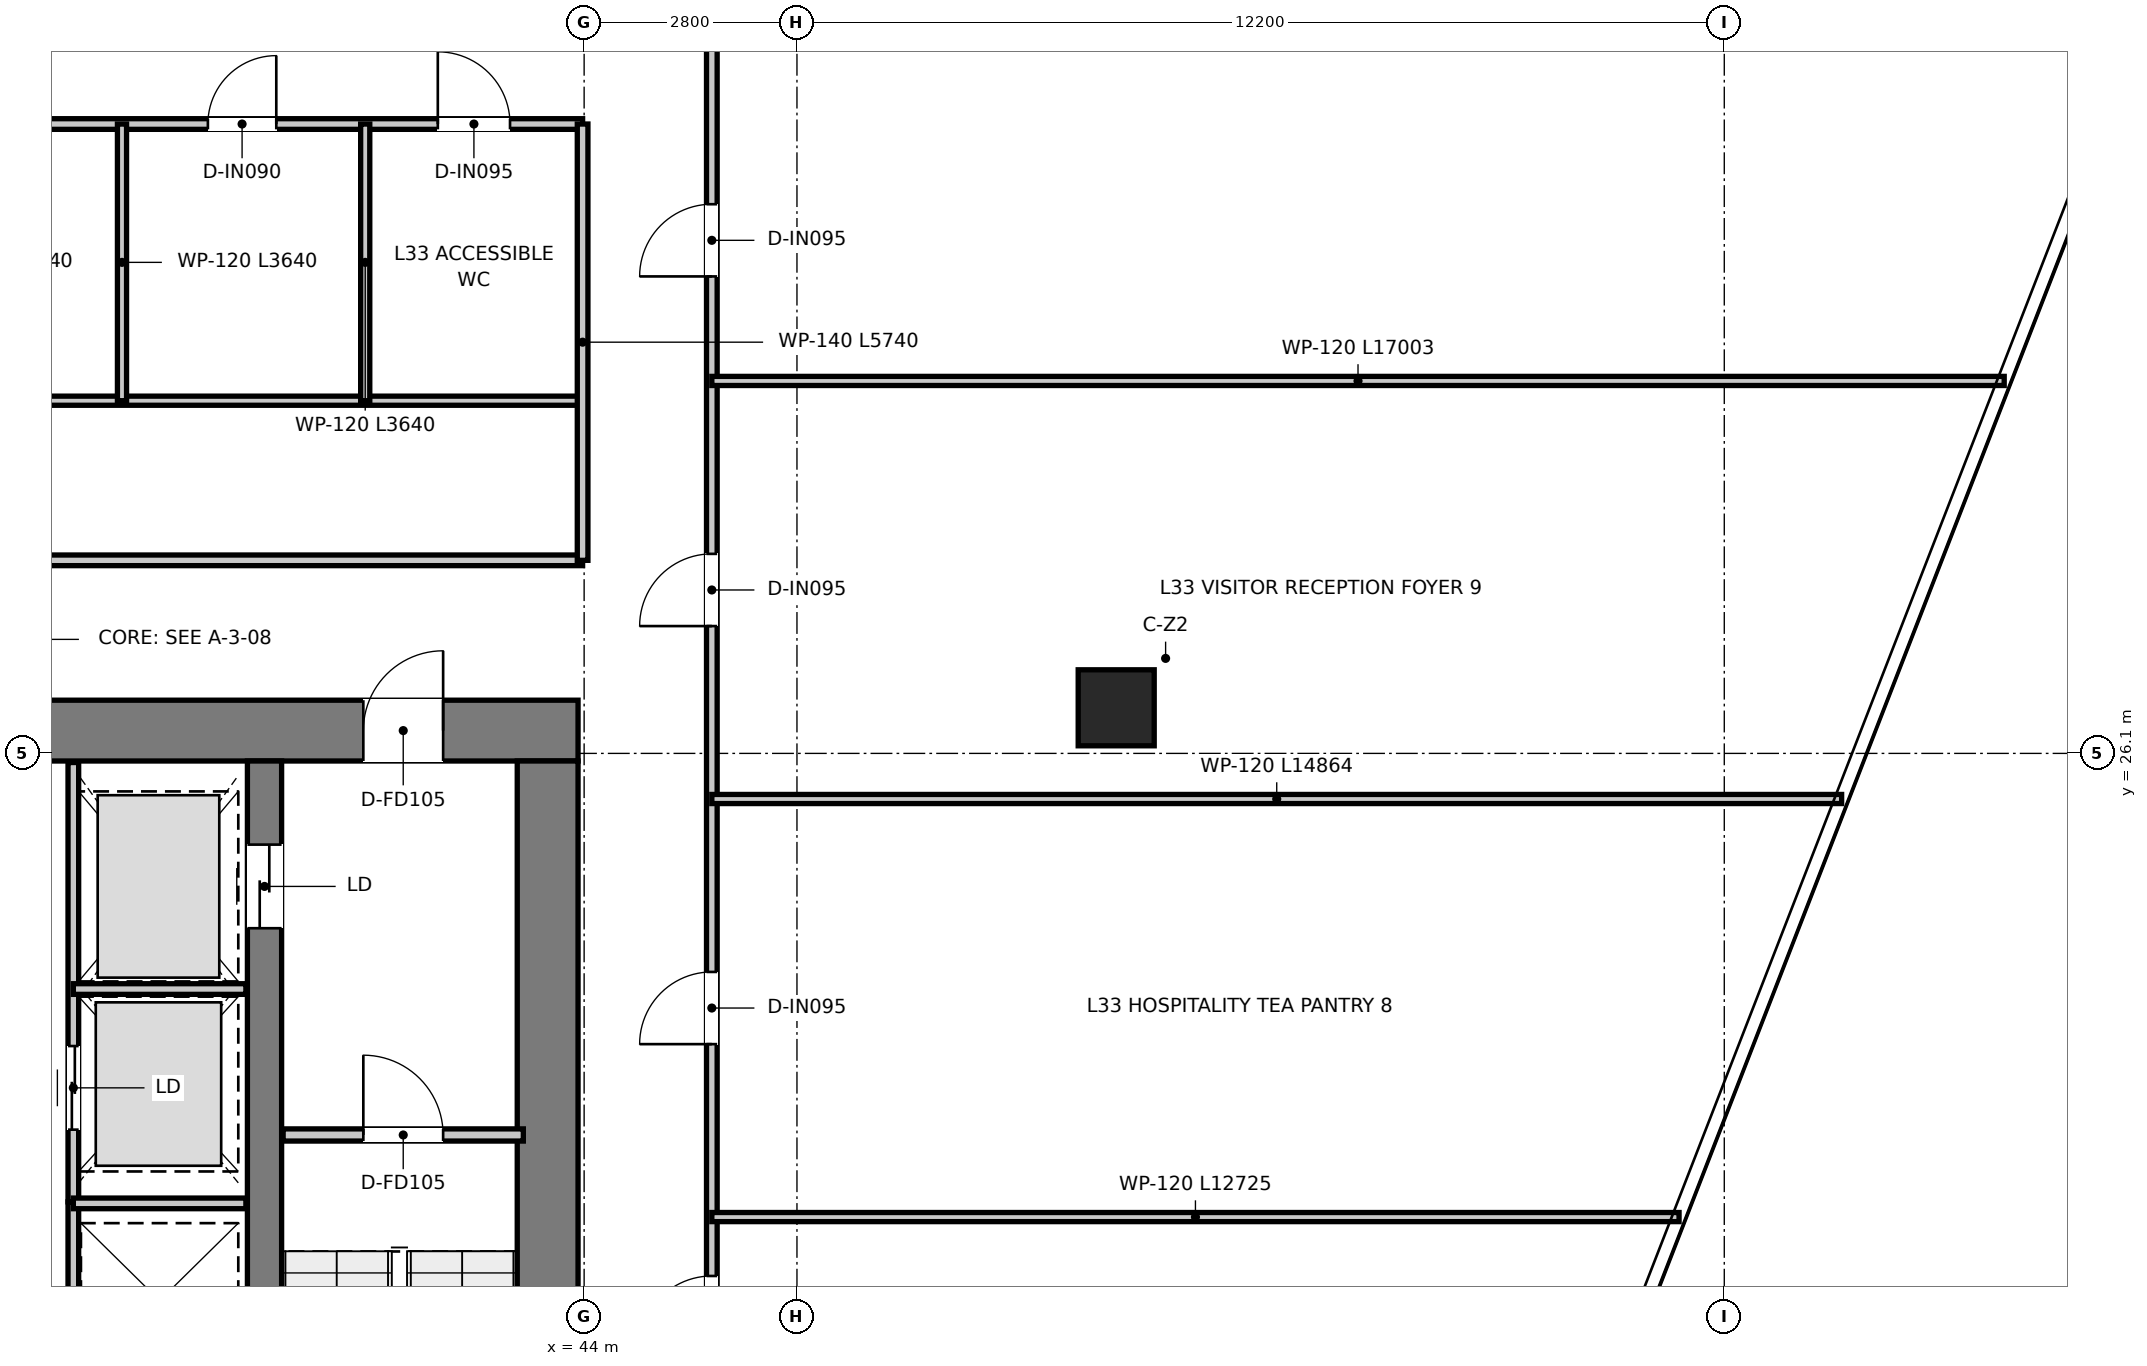
"""IFC4 building model, lengths in metres.
Left out: names, types, materials, properties, quantities, classifications, styles, units other than length and angle.
Written with IfcOpenShell. Run it as: python <this file> out.ifc"""

import sys

from ifc_helpers import new_model, si_unit, direction, frame, frame_2d, origin, origin_2d, place, context, subcontext, project, spatial, rectangle, extrude, source, transform, mapped, element, fill, save


model = new_model("IFC4")
c1 = context("Model", 3, precision=1e-05, world=origin(), true_north=direction((0.0, 1.0)))
c2 = subcontext(c1, "Body", "Model", "MODEL_VIEW")
j1 = project(units=[si_unit("LENGTHUNIT", "METRE"), si_unit("PLANEANGLEUNIT", "RADIAN")], contexts=[c1])
p1 = place(None, origin())
s1 = spatial("IfcSite", under=j1, at=p1, CompositionType="ELEMENT")
p2 = place(p1, origin())
s2 = spatial("IfcBuilding", under=s1, at=p2, CompositionType="ELEMENT")
p3 = place(p2, frame((0.0, 0.0, 137.45)))
s3 = spatial("IfcBuildingStorey", under=s2, at=p3, CompositionType="ELEMENT", Elevation=137.45)
p4 = place(p3, frame((28.08, 26.4, 0.0), z_axis=(0.0, 0.0, 1.0), x_axis=(1.0, 0.0, 0.0)))
e1 = element("IfcWall", 1, at=p4, inside=s3, PredefinedType="SHEAR", context=c2, shape_type="SweptSolid", body=[
    extrude(rectangle(XDim=15.84, YDim=0.8, at=frame_2d((7.92, 0.0))), origin(), (0.0, 0.0, 1.0), 3.95),
])
p5 = place(p4, frame((7.22, 0.0, 0.0)))
e2 = element("IfcOpeningElement", 2, at=p5, cuts=e1, PredefinedType="OPENING", context=c2, shape_type="SweptSolid", body=[
    extrude(rectangle(XDim=1.4, YDim=2.2, at=frame_2d((0.7, 1.1))), frame((0.0, 0.41, 0.0), z_axis=(0.0, -1.0, 0.0), x_axis=(1.0, 0.0, 0.0)), (0.0, 0.0, 1.0), 0.82),
])
p6 = place(p4, frame((1.775, 0.0, 0.0)))
e3 = element("IfcOpeningElement", 3, at=p6, cuts=e1, PredefinedType="OPENING", context=c2, shape_type="SweptSolid", body=[
    extrude(rectangle(XDim=1.05, YDim=2.1, at=frame_2d((0.525, 1.05))), frame((0.0, 0.41, 0.0), z_axis=(0.0, -1.0, 0.0), x_axis=(1.0, 0.0, 0.0)), (0.0, 0.0, 1.0), 0.82),
])
p7 = place(p4, frame((13.015, 0.0, 0.0)))
e4 = element("IfcOpeningElement", 4, at=p7, cuts=e1, PredefinedType="OPENING", context=c2, shape_type="SweptSolid", body=[
    extrude(rectangle(XDim=1.05, YDim=2.1, at=frame_2d((0.525, 1.05))), frame((0.0, 0.41, 0.0), z_axis=(0.0, -1.0, 0.0), x_axis=(1.0, 0.0, 0.0)), (0.0, 0.0, 1.0), 0.82),
])
p8 = place(p3, frame((43.52, 11.3, 0.0), z_axis=(0.0, 0.0, 1.0), x_axis=(0.0, 1.0, 0.0)))
e5 = element("IfcWall", 5, at=p8, inside=s3, PredefinedType="SHEAR", context=c2, shape_type="SweptSolid", body=[
    extrude(rectangle(XDim=14.7, YDim=0.8, at=frame_2d((7.35, 0.0))), origin(), (0.0, 0.0, 1.0), 3.95),
])
p9 = place(p3, frame((39.795, 13.22, 0.0), z_axis=(0.0, 0.0, 1.0), x_axis=(0.0, 1.0, 0.0)))
e6 = element("IfcWall", 6, at=p9, inside=s3, PredefinedType="SHEAR", context=c2, shape_type="SweptSolid", body=[
    extrude(rectangle(XDim=12.78, YDim=0.45, at=frame_2d((6.39, 0.0))), origin(), (0.0, 0.0, 1.0), 3.95),
])
p10 = place(p9, frame((10.58, 0.0, 0.0)))
e7 = element("IfcOpeningElement", 7, at=p10, cuts=e6, PredefinedType="OPENING", context=c2, shape_type="SweptSolid", body=[
    extrude(rectangle(XDim=1.1, YDim=2.15, at=frame_2d((0.55, 1.075))), frame((0.0, 0.235, 0.0), z_axis=(0.0, -1.0, 0.0), x_axis=(1.0, 0.0, 0.0)), (0.0, 0.0, 1.0), 0.47),
])
m1 = source(origin(), c2, "Body", "SweptSolid", [
    extrude(rectangle(XDim=1.0, YDim=1.0, at=origin_2d()), origin(), (0.0, 0.0, 1.0), 3.95),
])
p11 = place(p3, frame((51.0, 26.7, 0.0), z_axis=(0.0, 0.0, 1.0), x_axis=(1.0, 0.0, 0.0)))
e8 = element("IfcColumn", 8, at=p11, inside=s3, PredefinedType="COLUMN", context=c2, shape_type="MappedRepresentation", body=[
    mapped(m1, transform((0.0, 0.0, 0.0), x_axis=(1.0, 0.0, 0.0), y_axis=(0.0, 1.0, 0.0), z_axis=(0.0, 0.0, 1.0), scale=1.0)),
])
p12 = place(p3, frame((40.04, 21.08, 0.0), z_axis=(0.0, 0.0, 1.0), x_axis=(1.0, 0.0, 0.0)))
e9 = element("IfcWall", 9, at=p12, inside=s3, PredefinedType="PARTITIONING", context=c2, shape_type="SweptSolid", body=[
    extrude(rectangle(XDim=3.16, YDim=0.16, at=frame_2d((1.58, 0.0))), origin(), (0.0, 0.0, 1.0), 3.6),
])
p13 = place(p12, frame((1.055, 0.0, 0.0)))
e10 = element("IfcOpeningElement", 10, at=p13, cuts=e9, PredefinedType="OPENING", context=c2, shape_type="SweptSolid", body=[
    extrude(rectangle(XDim=1.05, YDim=2.1, at=frame_2d((0.525, 1.05))), frame((0.0, 0.09, 0.0), z_axis=(0.0, -1.0, 0.0), x_axis=(1.0, 0.0, 0.0)), (0.0, 0.0, 1.0), 0.18),
])
p14 = place(p3, frame((37.28, 20.2, 0.0), z_axis=(0.0, 0.0, 1.0), x_axis=(0.0, 1.0, 0.0)))
e11 = element("IfcWall", 11, at=p14, inside=s3, PredefinedType="PARTITIONING", context=c2, shape_type="SweptSolid", body=[
    extrude(rectangle(XDim=5.78, YDim=0.14, at=frame_2d((2.89, 0.0))), origin(), (0.0, 0.0, 1.0), 2.6),
])
p15 = place(p14, frame((0.95, 0.0, 0.0)))
e12 = element("IfcOpeningElement", 12, at=p15, cuts=e11, PredefinedType="OPENING", context=c2, shape_type="SweptSolid", body=[
    extrude(rectangle(XDim=1.1, YDim=2.15, at=frame_2d((0.55, 1.075))), frame((0.0, 0.08, 0.0), z_axis=(0.0, -1.0, 0.0), x_axis=(1.0, 0.0, 0.0)), (0.0, 0.0, 1.0), 0.16),
])
p16 = place(p3, frame((37.28, 23.0, 0.0), z_axis=(0.0, 0.0, 1.0), x_axis=(1.0, 0.0, 0.0)))
e13 = element("IfcWall", 13, at=p16, inside=s3, PredefinedType="PARTITIONING", context=c2, shape_type="SweptSolid", body=[
    extrude(rectangle(XDim=2.27, YDim=0.14, at=frame_2d((1.135, 0.0))), origin(), (0.0, 0.0, 1.0), 2.6),
])
p17 = place(p3, frame((37.28, 17.78, 0.0), z_axis=(0.0, 0.0, 1.0), x_axis=(0.0, 1.0, 0.0)))
e14 = element("IfcWall", 14, at=p17, inside=s3, PredefinedType="PARTITIONING", context=c2, shape_type="SweptSolid", body=[
    extrude(rectangle(XDim=2.42, YDim=0.14, at=frame_2d((1.21, 0.0))), origin(), (0.0, 0.0, 1.0), 3.6),
])
p18 = place(p3, frame((37.28, 20.18, 0.0), z_axis=(0.0, 0.0, 1.0), x_axis=(1.0, 0.0, 0.0)))
e15 = element("IfcWall", 15, at=p18, inside=s3, PredefinedType="PARTITIONING", context=c2, shape_type="SweptSolid", body=[
    extrude(rectangle(XDim=2.27, YDim=0.14, at=frame_2d((1.135, 0.0))), origin(), (0.0, 0.0, 1.0), 3.6),
])
p19 = place(p3, frame((28.02, 28.64, 0.0), z_axis=(0.0, 0.0, 1.0), x_axis=(1.0, 0.0, 0.0)))
e16 = element("IfcWall", 16, at=p19, inside=s3, PredefinedType="PARTITIONING", context=c2, shape_type="SweptSolid", body=[
    extrude(rectangle(XDim=15.96, YDim=0.14, at=frame_2d((7.98, 0.0))), origin(), (0.0, 0.0, 1.0), 3.01),
])
p20 = place(p19, frame((7.455, 0.0, 0.0)))
e17 = element("IfcOpeningElement", 17, at=p20, cuts=e16, PredefinedType="OPENING", context=c2, shape_type="SweptSolid", body=[
    extrude(rectangle(XDim=1.05, YDim=2.15, at=frame_2d((0.525, 1.075))), frame((0.0, 0.08, 0.0), z_axis=(0.0, -1.0, 0.0), x_axis=(1.0, 0.0, 0.0)), (0.0, 0.0, 1.0), 0.16),
])
p21 = place(p3, frame((28.02, 30.74, 0.0), z_axis=(0.0, 0.0, 1.0), x_axis=(1.0, 0.0, 0.0)))
e18 = element("IfcWall", 18, at=p21, inside=s3, PredefinedType="PARTITIONING", context=c2, shape_type="SweptSolid", body=[
    extrude(rectangle(XDim=15.96, YDim=0.12, at=frame_2d((7.98, 0.0))), origin(), (0.0, 0.0, 1.0), 3.01),
])
p22 = place(p3, frame((28.02, 34.38, 0.0), z_axis=(0.0, 0.0, 1.0), x_axis=(1.0, 0.0, 0.0)))
e19 = element("IfcWall", 19, at=p22, inside=s3, PredefinedType="PARTITIONING", context=c2, shape_type="SweptSolid", body=[
    extrude(rectangle(XDim=15.96, YDim=0.14, at=frame_2d((7.98, 0.0))), origin(), (0.0, 0.0, 1.0), 3.01),
])
p23 = place(p22, frame((7.83, 0.0, 0.0)))
e20 = element("IfcOpeningElement", 20, at=p23, cuts=e19, PredefinedType="OPENING", context=c2, shape_type="SweptSolid", body=[
    extrude(rectangle(XDim=0.9, YDim=2.1, at=frame_2d((0.45, 1.05))), frame((0.0, 0.08, 0.0), z_axis=(0.0, -1.0, 0.0), x_axis=(1.0, 0.0, 0.0)), (0.0, 0.0, 1.0), 0.16),
])
p24 = place(p22, frame((11.03, 0.0, 0.0)))
e21 = element("IfcOpeningElement", 21, at=p24, cuts=e19, PredefinedType="OPENING", context=c2, shape_type="SweptSolid", body=[
    extrude(rectangle(XDim=0.9, YDim=2.1, at=frame_2d((0.45, 1.05))), frame((0.0, 0.08, 0.0), z_axis=(0.0, -1.0, 0.0), x_axis=(1.0, 0.0, 0.0)), (0.0, 0.0, 1.0), 0.16),
])
p25 = place(p22, frame((14.055, 0.0, 0.0)))
e22 = element("IfcOpeningElement", 22, at=p25, cuts=e19, PredefinedType="OPENING", context=c2, shape_type="SweptSolid", body=[
    extrude(rectangle(XDim=0.95, YDim=2.1, at=frame_2d((0.475, 1.05))), frame((0.0, 0.08, 0.0), z_axis=(0.0, -1.0, 0.0), x_axis=(1.0, 0.0, 0.0)), (0.0, 0.0, 1.0), 0.16),
])
p26 = place(p22, frame((2.855, 0.0, 0.0)))
e23 = element("IfcOpeningElement", 23, at=p26, cuts=e19, PredefinedType="OPENING", context=c2, shape_type="SweptSolid", body=[
    extrude(rectangle(XDim=0.95, YDim=2.1, at=frame_2d((0.475, 1.05))), frame((0.0, 0.08, 0.0), z_axis=(0.0, -1.0, 0.0), x_axis=(1.0, 0.0, 0.0)), (0.0, 0.0, 1.0), 0.16),
])
p27 = place(p3, frame((43.98, 28.64, 0.0), z_axis=(0.0, 0.0, 1.0), x_axis=(0.0, 1.0, 0.0)))
e24 = element("IfcWall", 24, at=p27, inside=s3, PredefinedType="PARTITIONING", context=c2, shape_type="SweptSolid", body=[
    extrude(rectangle(XDim=5.74, YDim=0.14, at=frame_2d((2.87, 0.0))), origin(), (0.0, 0.0, 1.0), 3.2),
])
for number, where, z_axis, x_axis in (
    (25, (37.92, 30.74, 0.0), (0.0, 0.0, 1.0), (0.0, 1.0, 0.0)),
    (26, (41.12, 30.74, 0.0), (0.0, 0.0, 1.0), (0.0, 1.0, 0.0)),
):
    element("IfcWall", number, at=place(p3, frame(where, z_axis=z_axis, x_axis=x_axis)), inside=s3, PredefinedType="PARTITIONING", context=c2, shape_type="SweptSolid", body=[
        extrude(rectangle(XDim=3.64, YDim=0.12, at=frame_2d((1.82, 0.0))), origin(), (0.0, 0.0, 1.0), 3.1),
    ])
p28 = place(p3, frame((45.68, 10.5, 0.0), z_axis=(0.0, 0.0, 1.0), x_axis=(0.0, 1.0, 0.0)))
e27 = element("IfcWall", 27, at=p28, inside=s3, PredefinedType="PARTITIONING", context=c2, shape_type="SweptSolid", body=[
    extrude(rectangle(XDim=25.62, YDim=0.14, at=frame_2d((12.81, 0.0))), origin(), (0.0, 0.0, 1.0), 2.9),
])
p29 = place(p28, frame((7.775, 0.0, 0.0)))
e28 = element("IfcOpeningElement", 28, at=p29, cuts=e27, PredefinedType="OPENING", context=c2, shape_type="SweptSolid", body=[
    extrude(rectangle(XDim=0.95, YDim=2.1, at=frame_2d((0.475, 1.05))), frame((0.0, 0.08, 0.0), z_axis=(0.0, -1.0, 0.0), x_axis=(1.0, 0.0, 0.0)), (0.0, 0.0, 1.0), 0.16),
])
p30 = place(p28, frame((11.775, 0.0, 0.0)))
e29 = element("IfcOpeningElement", 29, at=p30, cuts=e27, PredefinedType="OPENING", context=c2, shape_type="SweptSolid", body=[
    extrude(rectangle(XDim=0.95, YDim=2.1, at=frame_2d((0.475, 1.05))), frame((0.0, 0.08, 0.0), z_axis=(0.0, -1.0, 0.0), x_axis=(1.0, 0.0, 0.0)), (0.0, 0.0, 1.0), 0.16),
])
p31 = place(p28, frame((17.275, 0.0, 0.0)))
e30 = element("IfcOpeningElement", 30, at=p31, cuts=e27, PredefinedType="OPENING", context=c2, shape_type="SweptSolid", body=[
    extrude(rectangle(XDim=0.95, YDim=2.1, at=frame_2d((0.475, 1.05))), frame((0.0, 0.08, 0.0), z_axis=(0.0, -1.0, 0.0), x_axis=(1.0, 0.0, 0.0)), (0.0, 0.0, 1.0), 0.16),
])
p32 = place(p28, frame((21.875, 0.0, 0.0)))
e31 = element("IfcOpeningElement", 31, at=p32, cuts=e27, PredefinedType="OPENING", context=c2, shape_type="SweptSolid", body=[
    extrude(rectangle(XDim=0.95, YDim=2.1, at=frame_2d((0.475, 1.05))), frame((0.0, 0.08, 0.0), z_axis=(0.0, -1.0, 0.0), x_axis=(1.0, 0.0, 0.0)), (0.0, 0.0, 1.0), 0.16),
])
p33 = place(p3, frame((45.68, 20.0, 0.0), z_axis=(0.0, 0.0, 1.0), x_axis=(1.0, 0.0, 0.0)))
e32 = element("IfcWall", 32, at=p33, inside=s3, PredefinedType="PARTITIONING", context=c2, shape_type="SweptSolid", body=[
    extrude(rectangle(XDim=12.725, YDim=0.12, at=frame_2d((6.363, 0.0))), origin(), (0.0, 0.0, 1.0), 2.9),
])
p34 = place(p3, frame((45.68, 25.5, 0.0), z_axis=(0.0, 0.0, 1.0), x_axis=(1.0, 0.0, 0.0)))
e33 = element("IfcWall", 33, at=p34, inside=s3, PredefinedType="PARTITIONING", context=c2, shape_type="SweptSolid", body=[
    extrude(rectangle(XDim=14.864, YDim=0.12, at=frame_2d((7.432, 0.0))), origin(), (0.0, 0.0, 1.0), 2.9),
])
p35 = place(p3, frame((45.68, 31.0, 0.0), z_axis=(0.0, 0.0, 1.0), x_axis=(1.0, 0.0, 0.0)))
e34 = element("IfcWall", 34, at=p35, inside=s3, PredefinedType="PARTITIONING", context=c2, shape_type="SweptSolid", body=[
    extrude(rectangle(XDim=17.003, YDim=0.12, at=frame_2d((8.501, 0.0))), origin(), (0.0, 0.0, 1.0), 2.9),
])
p36 = place(p13, origin())
e35 = element("IfcDoor", 35, at=p36, inside=s3, OperationType="SINGLE_SWING_LEFT", PredefinedType="DOOR", context=c2, shape_type="SweptSolid", body=[
    extrude(rectangle(XDim=1.05, YDim=2.1, at=frame_2d((0.525, 1.05))), frame((0.0, 0.025, 0.0), z_axis=(0.0, -1.0, 0.0), x_axis=(1.0, 0.0, 0.0)), (0.0, 0.0, 1.0), 0.05),
])
fill(e10, e35)
p37 = place(p7, origin())
e36 = element("IfcDoor", 36, at=p37, inside=s3, OperationType="SINGLE_SWING_RIGHT", PredefinedType="DOOR", context=c2, shape_type="SweptSolid", body=[
    extrude(rectangle(XDim=1.05, YDim=2.1, at=frame_2d((0.525, 1.05))), frame((0.0, 0.025, 0.0), z_axis=(0.0, -1.0, 0.0), x_axis=(1.0, 0.0, 0.0)), (0.0, 0.0, 1.0), 0.05),
])
fill(e4, e36)
p38 = place(p10, origin())
e37 = element("IfcDoor", 37, at=p38, inside=s3, OperationType="DOUBLE_DOOR_SLIDING", PredefinedType="DOOR", context=c2, shape_type="SweptSolid", body=[
    extrude(rectangle(XDim=1.1, YDim=2.15, at=frame_2d((0.55, 1.075))), frame((0.0, 0.025, 0.0), z_axis=(0.0, -1.0, 0.0), x_axis=(1.0, 0.0, 0.0)), (0.0, 0.0, 1.0), 0.05),
])
fill(e7, e37)
p39 = place(p15, origin())
e38 = element("IfcDoor", 38, at=p39, inside=s3, OperationType="DOUBLE_DOOR_SLIDING", PredefinedType="DOOR", context=c2, shape_type="SweptSolid", body=[
    extrude(rectangle(XDim=1.1, YDim=2.15, at=frame_2d((0.55, 1.075))), frame((0.0, 0.025, 0.0), z_axis=(0.0, -1.0, 0.0), x_axis=(1.0, 0.0, 0.0)), (0.0, 0.0, 1.0), 0.05),
])
fill(e12, e38)
p40 = place(p24, origin())
e39 = element("IfcDoor", 39, at=p40, inside=s3, OperationType="SINGLE_SWING_RIGHT", PredefinedType="DOOR", context=c2, shape_type="SweptSolid", body=[
    extrude(rectangle(XDim=0.9, YDim=2.1, at=frame_2d((0.45, 1.05))), frame((0.0, 0.025, 0.0), z_axis=(0.0, -1.0, 0.0), x_axis=(1.0, 0.0, 0.0)), (0.0, 0.0, 1.0), 0.05),
])
fill(e21, e39)
p41 = place(p25, origin())
e40 = element("IfcDoor", 40, at=p41, inside=s3, OperationType="SINGLE_SWING_LEFT", PredefinedType="DOOR", context=c2, shape_type="SweptSolid", body=[
    extrude(rectangle(XDim=0.95, YDim=2.1, at=frame_2d((0.475, 1.05))), frame((0.0, 0.025, 0.0), z_axis=(0.0, -1.0, 0.0), x_axis=(1.0, 0.0, 0.0)), (0.0, 0.0, 1.0), 0.05),
])
fill(e22, e40)
p42 = place(p29, origin())
e41 = element("IfcDoor", 41, at=p42, inside=s3, OperationType="SINGLE_SWING_LEFT", PredefinedType="DOOR", context=c2, shape_type="SweptSolid", body=[
    extrude(rectangle(XDim=0.95, YDim=2.1, at=frame_2d((0.475, 1.05))), frame((0.0, 0.025, 0.0), z_axis=(0.0, -1.0, 0.0), x_axis=(1.0, 0.0, 0.0)), (0.0, 0.0, 1.0), 0.05),
])
fill(e28, e41)
p43 = place(p30, origin())
e42 = element("IfcDoor", 42, at=p43, inside=s3, OperationType="SINGLE_SWING_LEFT", PredefinedType="DOOR", context=c2, shape_type="SweptSolid", body=[
    extrude(rectangle(XDim=0.95, YDim=2.1, at=frame_2d((0.475, 1.05))), frame((0.0, 0.025, 0.0), z_axis=(0.0, -1.0, 0.0), x_axis=(1.0, 0.0, 0.0)), (0.0, 0.0, 1.0), 0.05),
])
fill(e29, e42)
p44 = place(p31, origin())
e43 = element("IfcDoor", 43, at=p44, inside=s3, OperationType="SINGLE_SWING_LEFT", PredefinedType="DOOR", context=c2, shape_type="SweptSolid", body=[
    extrude(rectangle(XDim=0.95, YDim=2.1, at=frame_2d((0.475, 1.05))), frame((0.0, 0.025, 0.0), z_axis=(0.0, -1.0, 0.0), x_axis=(1.0, 0.0, 0.0)), (0.0, 0.0, 1.0), 0.05),
])
fill(e30, e43)
p45 = place(p32, origin())
e44 = element("IfcDoor", 44, at=p45, inside=s3, OperationType="SINGLE_SWING_LEFT", PredefinedType="DOOR", context=c2, shape_type="SweptSolid", body=[
    extrude(rectangle(XDim=0.95, YDim=2.1, at=frame_2d((0.475, 1.05))), frame((0.0, 0.025, 0.0), z_axis=(0.0, -1.0, 0.0), x_axis=(1.0, 0.0, 0.0)), (0.0, 0.0, 1.0), 0.05),
])
fill(e31, e44)
save(model, sys.argv[1])
